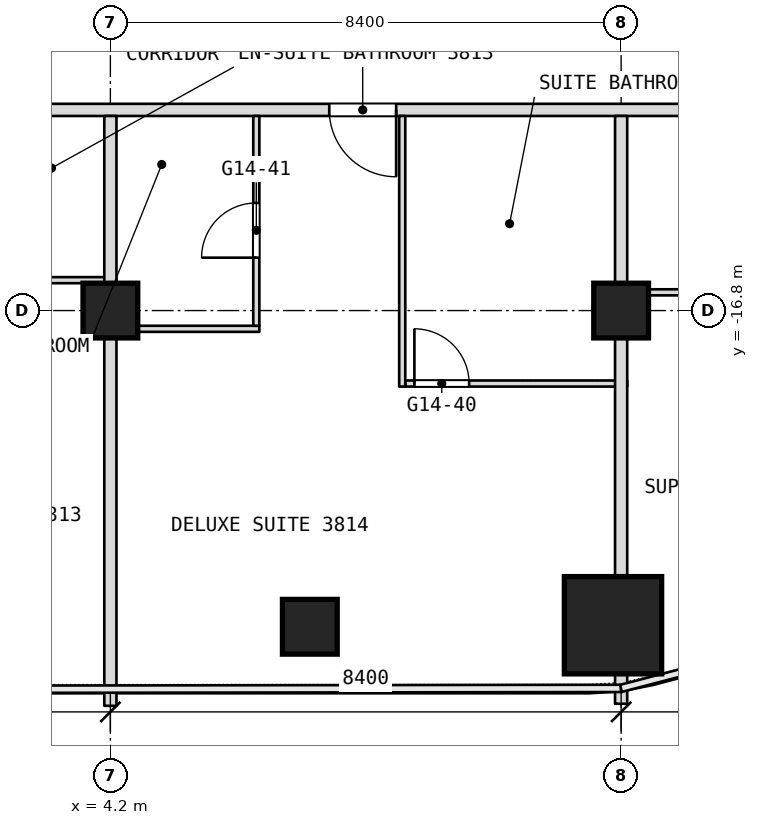
"""IFC4 building model, lengths in metres.
Left out: names, types, materials, properties, quantities, classifications, styles, units other than length and angle.
Written with IfcOpenShell. Run it as: python <this file> out.ifc"""

import sys

from ifc_helpers import new_model, si_unit, direction, frame, frame_2d, origin, origin_2d, place, context, subcontext, project, spatial, rectangle, extrude, element, fill, save


model = new_model("IFC4")
c1 = context("Model", 3, precision=1e-05, world=origin(), true_north=direction((0.0, 1.0)))
c2 = subcontext(c1, "Body", "Model", "MODEL_VIEW")
j1 = project(units=[si_unit("LENGTHUNIT", "METRE"), si_unit("PLANEANGLEUNIT", "RADIAN")], contexts=[c1])
p1 = place(None, origin())
s1 = spatial("IfcSite", under=j1, at=p1, CompositionType="ELEMENT")
p2 = place(p1, origin())
s2 = spatial("IfcBuilding", under=s1, at=p2, CompositionType="ELEMENT")
p3 = place(p2, frame((0.0, 0.0, 162.5)))
s3 = spatial("IfcBuildingStorey", under=s2, at=p3, CompositionType="ELEMENT", Elevation=162.5)
p4 = place(p3, frame((12.466, -21.975, 0.0), z_axis=(0.0, 0.0, 1.0), x_axis=(1.0, 0.0, 0.0)))
e1 = element("IfcColumn", 1, at=p4, inside=s3, PredefinedType="COLUMN", context=c2, shape_type="SweptSolid", body=[
    extrude(rectangle(XDim=1.6, YDim=1.6, at=origin_2d()), origin(), (0.0, 0.0, 1.0), 3.6),
])
for number, where, z_axis, x_axis in (
    (2, (4.2, -16.8, 0.0), (0.0, 0.0, 1.0), (1.0, 0.0, 0.0)),
    (3, (12.6, -16.8, 0.0), (0.0, 0.0, 1.0), (1.0, 0.0, 0.0)),
    (4, (7.48, -22.0, 0.0), (0.0, 0.0, 1.0), (1.0, 0.0, 0.0)),
):
    element("IfcColumn", number, at=place(p3, frame(where, z_axis=z_axis, x_axis=x_axis)), inside=s3, PredefinedType="COLUMN", context=c2, shape_type="SweptSolid", body=[
        extrude(rectangle(XDim=0.9, YDim=0.9, at=origin_2d()), origin(), (0.0, 0.0, 1.0), 3.6),
    ])
p5 = place(p3, frame((9.05, -18.0, 0.0), z_axis=(0.0, 0.0, 1.0), x_axis=(1.0, 0.0, 0.0)))
e5 = element("IfcWall", 5, at=p5, inside=s3, PredefinedType="PARTITIONING", context=c2, shape_type="SweptSolid", body=[
    extrude(rectangle(XDim=3.65, YDim=0.1, at=frame_2d((1.825, 0.0))), origin(), (0.0, 0.0, 1.0), 3.34),
])
p6 = place(p5, frame((0.15, 0.0, 0.0)))
e6 = element("IfcOpeningElement", 6, at=p6, cuts=e5, PredefinedType="OPENING", context=c2, shape_type="SweptSolid", body=[
    extrude(rectangle(XDim=0.9, YDim=2.1, at=frame_2d((0.45, 1.05))), frame((0.0, 0.05, 0.0), z_axis=(0.0, -1.0, 0.0), x_axis=(1.0, 0.0, 0.0)), (0.0, 0.0, 1.0), 0.1),
])
p7 = place(p3, frame((4.3, -17.1, 0.0), z_axis=(0.0, 0.0, 1.0), x_axis=(1.0, 0.0, 0.0)))
e7 = element("IfcWall", 7, at=p7, inside=s3, PredefinedType="PARTITIONING", context=c2, shape_type="SweptSolid", body=[
    extrude(rectangle(XDim=2.35, YDim=0.1, at=frame_2d((1.175, 0.0))), origin(), (0.0, 0.0, 1.0), 3.34),
])
p8 = place(p3, frame((12.7, -16.5, 0.0), z_axis=(0.0, 0.0, 1.0), x_axis=(1.0, 0.0, 0.0)))
e8 = element("IfcWall", 8, at=p8, inside=s3, PredefinedType="PARTITIONING", context=c2, shape_type="SweptSolid", body=[
    extrude(rectangle(XDim=2.35, YDim=0.1, at=frame_2d((1.175, 0.0))), origin(), (0.0, 0.0, 1.0), 3.34),
])
p9 = place(p8, frame((1.3, 0.0, 0.0)))
e9 = element("IfcOpeningElement", 9, at=p9, cuts=e8, PredefinedType="OPENING", context=c2, shape_type="SweptSolid", body=[
    extrude(rectangle(XDim=0.9, YDim=2.1, at=frame_2d((0.45, 1.05))), frame((0.0, 0.05, 0.0), z_axis=(0.0, -1.0, 0.0), x_axis=(1.0, 0.0, 0.0)), (0.0, 0.0, 1.0), 0.1),
])
p10 = place(p3, frame((1.85, -16.3, 0.0), z_axis=(0.0, 0.0, 1.0), x_axis=(1.0, 0.0, 0.0)))
e10 = element("IfcWall", 10, at=p10, inside=s3, PredefinedType="PARTITIONING", context=c2, shape_type="SweptSolid", body=[
    extrude(rectangle(XDim=2.45, YDim=0.1, at=frame_2d((1.225, 0.0))), origin(), (0.0, 0.0, 1.0), 3.34),
])
p11 = place(p10, frame((0.15, 0.0, 0.0)))
e11 = element("IfcOpeningElement", 11, at=p11, cuts=e10, PredefinedType="OPENING", context=c2, shape_type="SweptSolid", body=[
    extrude(rectangle(XDim=0.9, YDim=2.1, at=frame_2d((0.45, 1.05))), frame((0.0, 0.05, 0.0), z_axis=(0.0, -1.0, 0.0), x_axis=(1.0, 0.0, 0.0)), (0.0, 0.0, 1.0), 0.1),
])
p12 = place(p3, frame((-3.2, -13.5, 0.0), z_axis=(0.0, 0.0, 1.0), x_axis=(1.0, 0.0, 0.0)))
e12 = element("IfcWall", 12, at=p12, inside=s3, PredefinedType="PARTITIONING", context=c2, shape_type="SweptSolid", body=[
    extrude(rectangle(XDim=19.9, YDim=0.2, at=frame_2d((9.95, 0.0))), origin(), (0.0, 0.0, 1.0), 3.34),
])
p13 = place(p12, frame((1.8, 0.0, 0.0)))
e13 = element("IfcOpeningElement", 13, at=p13, cuts=e12, PredefinedType="OPENING", context=c2, shape_type="SweptSolid", body=[
    extrude(rectangle(XDim=1.0, YDim=2.1, at=frame_2d((0.5, 1.05))), frame((0.0, 0.1, 0.0), z_axis=(0.0, -1.0, 0.0), x_axis=(1.0, 0.0, 0.0)), (0.0, 0.0, 1.0), 0.2),
])
p14 = place(p12, frame((3.6, 0.0, 0.0)))
e14 = element("IfcOpeningElement", 14, at=p14, cuts=e12, PredefinedType="OPENING", context=c2, shape_type="SweptSolid", body=[
    extrude(rectangle(XDim=1.0, YDim=2.1, at=frame_2d((0.5, 1.05))), frame((0.0, 0.1, 0.0), z_axis=(0.0, -1.0, 0.0), x_axis=(1.0, 0.0, 0.0)), (0.0, 0.0, 1.0), 0.2),
])
p15 = place(p12, frame((11.0, 0.0, 0.0)))
e15 = element("IfcOpeningElement", 15, at=p15, cuts=e12, PredefinedType="OPENING", context=c2, shape_type="SweptSolid", body=[
    extrude(rectangle(XDim=1.1, YDim=2.1, at=frame_2d((0.55, 1.05))), frame((0.0, 0.1, 0.0), z_axis=(0.0, -1.0, 0.0), x_axis=(1.0, 0.0, 0.0)), (0.0, 0.0, 1.0), 0.2),
])
p16 = place(p12, frame((18.6, 0.0, 0.0)))
e16 = element("IfcOpeningElement", 16, at=p16, cuts=e12, PredefinedType="OPENING", context=c2, shape_type="SweptSolid", body=[
    extrude(rectangle(XDim=1.0, YDim=2.1, at=frame_2d((0.5, 1.05))), frame((0.0, 0.1, 0.0), z_axis=(0.0, -1.0, 0.0), x_axis=(1.0, 0.0, 0.0)), (0.0, 0.0, 1.0), 0.2),
])
p17 = place(p3, frame((12.6, -23.266, 0.0), z_axis=(0.0, 0.0, 1.0), x_axis=(0.0, 1.0, 0.0)))
e17 = element("IfcWall", 17, at=p17, inside=s3, PredefinedType="PARTITIONING", context=c2, shape_type="SweptSolid", body=[
    extrude(rectangle(XDim=0.491, YDim=0.2, at=frame_2d((0.246, 0.0))), origin(), (0.0, 0.0, 1.0), 3.34),
])
p18 = place(p3, frame((12.6, -21.175, 0.0), z_axis=(0.0, 0.0, 1.0), x_axis=(0.0, 1.0, 0.0)))
e18 = element("IfcWall", 18, at=p18, inside=s3, PredefinedType="PARTITIONING", context=c2, shape_type="SweptSolid", body=[
    extrude(rectangle(XDim=7.575, YDim=0.2, at=frame_2d((3.788, 0.0))), origin(), (0.0, 0.0, 1.0), 3.34),
])
p19 = place(p3, frame((9.0, -18.05, 0.0), z_axis=(0.0, 0.0, 1.0), x_axis=(0.0, 1.0, 0.0)))
e19 = element("IfcWall", 19, at=p19, inside=s3, PredefinedType="PARTITIONING", context=c2, shape_type="SweptSolid", body=[
    extrude(rectangle(XDim=4.45, YDim=0.1, at=frame_2d((2.225, 0.0))), origin(), (0.0, 0.0, 1.0), 3.34),
])
p20 = place(p3, frame((6.6, -17.05, 0.0), z_axis=(0.0, 0.0, 1.0), x_axis=(0.0, 1.0, 0.0)))
e20 = element("IfcWall", 20, at=p20, inside=s3, PredefinedType="PARTITIONING", context=c2, shape_type="SweptSolid", body=[
    extrude(rectangle(XDim=3.45, YDim=0.1, at=frame_2d((1.725, 0.0))), origin(), (0.0, 0.0, 1.0), 3.34),
])
p21 = place(p20, frame((1.12, 0.0, 0.0)))
e21 = element("IfcOpeningElement", 21, at=p21, cuts=e20, PredefinedType="OPENING", context=c2, shape_type="SweptSolid", body=[
    extrude(rectangle(XDim=0.9, YDim=2.1, at=frame_2d((0.45, 1.05))), frame((0.0, 0.05, 0.0), z_axis=(0.0, -1.0, 0.0), x_axis=(1.0, 0.0, 0.0)), (0.0, 0.0, 1.0), 0.1),
])
p22 = place(p3, frame((4.2, -23.3, 0.0), z_axis=(0.0, 0.0, 1.0), x_axis=(0.0, 1.0, 0.0)))
e22 = element("IfcWall", 22, at=p22, inside=s3, PredefinedType="PARTITIONING", context=c2, shape_type="SweptSolid", body=[
    extrude(rectangle(XDim=9.7, YDim=0.2, at=frame_2d((4.85, 0.0))), origin(), (0.0, 0.0, 1.0), 3.34),
])
p23 = place(p6, origin())
e23 = element("IfcDoor", 23, at=p23, inside=s3, OperationType="SINGLE_SWING_LEFT", PredefinedType="DOOR", context=c2, shape_type="SweptSolid", body=[
    extrude(rectangle(XDim=0.9, YDim=2.1, at=frame_2d((0.45, 1.05))), frame((0.0, 0.025, 0.0), z_axis=(0.0, -1.0, 0.0), x_axis=(1.0, 0.0, 0.0)), (0.0, 0.0, 1.0), 0.05),
])
fill(e6, e23)
p24 = place(p15, origin())
e24 = element("IfcDoor", 24, at=p24, inside=s3, OperationType="SINGLE_SWING_LEFT", PredefinedType="DOOR", context=c2, shape_type="SweptSolid", body=[
    extrude(rectangle(XDim=1.1, YDim=2.1, at=frame_2d((0.55, 1.05))), frame((0.0, 0.025, 0.0), z_axis=(0.0, -1.0, 0.0), x_axis=(1.0, 0.0, 0.0)), (0.0, 0.0, 1.0), 0.05),
])
fill(e15, e24)
p25 = place(p21, origin())
e25 = element("IfcDoor", 25, at=p25, inside=s3, OperationType="SINGLE_SWING_LEFT", PredefinedType="DOOR", context=c2, shape_type="SweptSolid", body=[
    extrude(rectangle(XDim=0.9, YDim=2.1, at=frame_2d((0.45, 1.05))), frame((0.0, 0.025, 0.0), z_axis=(0.0, -1.0, 0.0), x_axis=(1.0, 0.0, 0.0)), (0.0, 0.0, 1.0), 0.05),
])
fill(e21, e25)
save(model, sys.argv[1])
